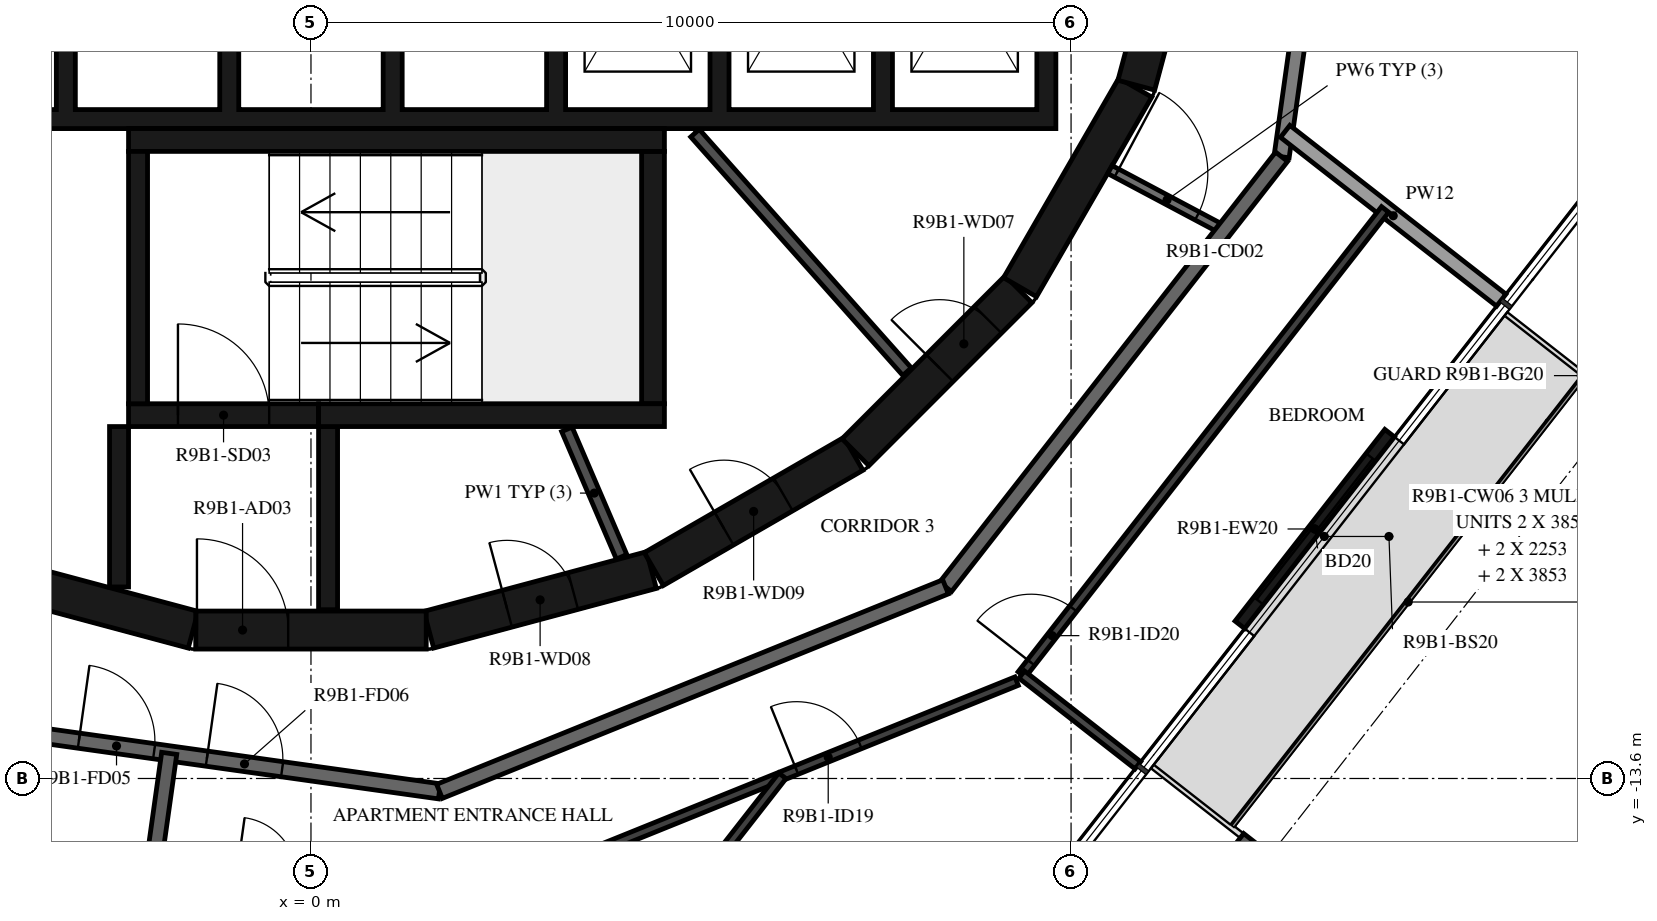
"""IFC4 building model, lengths in metres.
Left out: names, types, materials, properties, quantities, classifications, styles, units other than length and angle.
Written with IfcOpenShell. Run it as: python <this file> out.ifc"""

import sys

from ifc_helpers import new_model, si_unit, direction, frame, frame_2d, origin, origin_2d, place, context, subcontext, project, spatial, polyline, rectangle, i_section, outline, extrude, element, fill, save


model = new_model("IFC4")
c1 = context("Model", 3, precision=1e-05, world=origin(), true_north=direction((0.0, 1.0)))
c2 = subcontext(c1, "Body", "Model", "MODEL_VIEW")
j1 = project(units=[si_unit("LENGTHUNIT", "METRE"), si_unit("PLANEANGLEUNIT", "RADIAN")], contexts=[c1])
p1 = place(None, origin())
s1 = spatial("IfcSite", under=j1, at=p1, CompositionType="ELEMENT")
p2 = place(p1, origin())
s2 = spatial("IfcBuilding", under=s1, at=p2, CompositionType="ELEMENT")
p3 = place(p2, frame((0.0, 0.0, 343.5)))
s3 = spatial("IfcBuildingStorey", under=s2, at=p3, CompositionType="ELEMENT", Elevation=343.5)
p4 = place(p3, frame((12.533, -14.719, -0.38), z_axis=(0.0, 0.0, 1.0), x_axis=(-0.615661060634, -0.788011077599, 0.0)))
e1 = element("IfcColumn", 1, at=p4, inside=s3, PredefinedType="COLUMN", context=c2, shape_type="SweptSolid", body=[
    extrude(i_section(OverallWidth=0.3, OverallDepth=0.9, WebThickness=0.019, FlangeThickness=0.035, FilletRadius=0.03, at=origin_2d()), origin(), (0.0, 0.0, 1.0), 3.5),
])
p5 = place(p3, frame((12.221, -11.578, 0.0), z_axis=(0.0, 0.0, 1.0), x_axis=(0.615666248856, 0.788007024093, 0.0)))
e2 = element("IfcWall", 2, at=p5, inside=s3, PredefinedType="STANDARD", context=c2, shape_type="SweptSolid", body=[
    extrude(rectangle(XDim=3.2, YDim=0.16, at=frame_2d((1.6, 0.0))), origin(), (0.0, 0.0, 1.0), 3.12),
])
p6 = place(p5, frame((0.4, 0.0, 0.0)))
e3 = element("IfcOpeningElement", 3, at=p6, cuts=e2, PredefinedType="OPENING", context=c2, shape_type="SweptSolid", body=[
    extrude(rectangle(XDim=2.4, YDim=2.4, at=frame_2d((1.2, 1.2))), frame((0.0, 0.09, 0.0), z_axis=(0.0, -1.0, 0.0), x_axis=(1.0, 0.0, 0.0)), (0.0, 0.0, 1.0), 0.18),
])
p7 = place(p3, frame((1.55, -11.643, 0.0), z_axis=(0.0, 0.0, 1.0), x_axis=(0.965948410781, 0.258734743916, 0.0)))
e4 = element("IfcWall", 4, at=p7, inside=s3, PredefinedType="SHEAR", context=c2, shape_type="SweptSolid", body=[
    extrude(rectangle(XDim=3.033, YDim=0.5, at=frame_2d((1.516, 0.0))), origin(), (0.0, 0.0, 1.0), 3.12),
])
p8 = place(p7, frame((1.066, 0.0, 0.0)))
e5 = element("IfcOpeningElement", 5, at=p8, cuts=e4, PredefinedType="OPENING", context=c2, shape_type="SweptSolid", body=[
    extrude(rectangle(XDim=0.9, YDim=2.1, at=frame_2d((0.45, 1.05))), frame((0.0, 0.26, 0.0), z_axis=(0.0, -1.0, 0.0), x_axis=(1.0, 0.0, 0.0)), (0.0, 0.0, 1.0), 0.52),
])
p9 = place(p3, frame((4.51, -10.845, 0.0), z_axis=(0.0, 0.0, 1.0), x_axis=(0.865975092491, 0.500087131594, 0.0)))
e6 = element("IfcWall", 6, at=p9, inside=s3, PredefinedType="SHEAR", context=c2, shape_type="SweptSolid", body=[
    extrude(rectangle(XDim=3.033, YDim=0.5, at=frame_2d((1.516, 0.0))), origin(), (0.0, 0.0, 1.0), 3.12),
])
p10 = place(p9, frame((1.066, 0.0, 0.0)))
e7 = element("IfcOpeningElement", 7, at=p10, cuts=e6, PredefinedType="OPENING", context=c2, shape_type="SweptSolid", body=[
    extrude(rectangle(XDim=0.9, YDim=2.1, at=frame_2d((0.45, 1.05))), frame((0.0, 0.26, 0.0), z_axis=(0.0, -1.0, 0.0), x_axis=(1.0, 0.0, 0.0)), (0.0, 0.0, 1.0), 0.52),
])
p11 = place(p3, frame((7.164, -9.308, 0.0), z_axis=(0.0, 0.0, 1.0), x_axis=(0.707106781187, 0.707106781187, 0.0)))
e8 = element("IfcWall", 8, at=p11, inside=s3, PredefinedType="SHEAR", context=c2, shape_type="SweptSolid", body=[
    extrude(rectangle(XDim=3.032, YDim=0.5, at=frame_2d((1.516, 0.0))), origin(), (0.0, 0.0, 1.0), 3.12),
])
p12 = place(p11, frame((1.566, 0.0, 0.0)))
e9 = element("IfcOpeningElement", 9, at=p12, cuts=e8, PredefinedType="OPENING", context=c2, shape_type="SweptSolid", body=[
    extrude(rectangle(XDim=0.9, YDim=2.1, at=frame_2d((0.45, 1.05))), frame((0.0, 0.26, 0.0), z_axis=(0.0, -1.0, 0.0), x_axis=(1.0, 0.0, 0.0)), (0.0, 0.0, 1.0), 0.52),
])
for number, where, z_axis, x_axis in (
    (10, (9.329, -7.137, 0.0), (0.0, 0.0, 1.0), (0.5, 0.866, 0.0)),
    (11, (10.858, -4.479, 0.0), (0.0, 0.0, 1.0), (0.259, 0.966, 0.0)),
    (12, (-4.479, -10.858, 0.0), (0.0, 0.0, 1.0), (0.966, -0.259, 0.0)),
):
    element("IfcWall", number, at=place(p3, frame(where, z_axis=z_axis, x_axis=x_axis)), inside=s3, PredefinedType="SHEAR", context=c2, shape_type="SweptSolid", body=[
        extrude(rectangle(XDim=3.033, YDim=0.5, at=frame_2d((1.516, 0.0))), origin(), (0.0, 0.0, 1.0), 3.12),
    ])
p13 = place(p3, frame((-1.516, -11.647, 0.0), z_axis=(0.0, 0.0, 1.0), x_axis=(1.0, 0.0, 0.0)))
e13 = element("IfcWall", 13, at=p13, inside=s3, PredefinedType="SHEAR", context=c2, shape_type="SweptSolid", body=[
    extrude(rectangle(XDim=3.033, YDim=0.5, at=frame_2d((1.516, 0.0))), origin(), (0.0, 0.0, 1.0), 3.12),
])
p14 = place(p13, frame((0.016, 0.0, 0.0)))
e14 = element("IfcOpeningElement", 14, at=p14, cuts=e13, PredefinedType="OPENING", context=c2, shape_type="SweptSolid", body=[
    extrude(rectangle(XDim=1.2, YDim=2.1, at=frame_2d((0.6, 1.05))), frame((0.0, 0.26, 0.0), z_axis=(0.0, -1.0, 0.0), x_axis=(1.0, 0.0, 0.0)), (0.0, 0.0, 1.0), 0.52),
])
p15 = place(p3, frame((-2.275, -8.67, 0.0), z_axis=(0.0, 0.0, 1.0), x_axis=(0.0, 1.0, 0.0)))
e15 = element("IfcWall", 15, at=p15, inside=s3, PredefinedType="SHEAR", context=c2, shape_type="SweptSolid", body=[
    extrude(rectangle(XDim=3.32, YDim=0.25, at=frame_2d((1.66, 0.0))), origin(), (0.0, 0.0, 1.0), 3.12),
])
p16 = place(p3, frame((-2.4, -5.2, 0.0), z_axis=(0.0, 0.0, 1.0), x_axis=(1.0, 0.0, 0.0)))
e16 = element("IfcWall", 16, at=p16, inside=s3, PredefinedType="SHEAR", context=c2, shape_type="SweptSolid", body=[
    extrude(rectangle(XDim=7.05, YDim=0.3, at=frame_2d((3.525, 0.0))), origin(), (0.0, 0.0, 1.0), 3.12),
])
p17 = place(p3, frame((4.5, -8.67, 0.0), z_axis=(0.0, 0.0, 1.0), x_axis=(0.0, 1.0, 0.0)))
e17 = element("IfcWall", 17, at=p17, inside=s3, PredefinedType="SHEAR", context=c2, shape_type="SweptSolid", body=[
    extrude(rectangle(XDim=3.32, YDim=0.3, at=frame_2d((1.66, 0.0))), origin(), (0.0, 0.0, 1.0), 3.12),
])
p18 = place(p3, frame((0.1, -8.82, 0.0), z_axis=(0.0, 0.0, 1.0), x_axis=(1.0, 0.0, 0.0)))
e18 = element("IfcWall", 18, at=p18, inside=s3, PredefinedType="SHEAR", context=c2, shape_type="SweptSolid", body=[
    extrude(rectangle(XDim=4.55, YDim=0.3, at=frame_2d((2.275, 0.0))), origin(), (0.0, 0.0, 1.0), 3.12),
])
p19 = place(p3, frame((-2.4, -8.82, 0.0), z_axis=(0.0, 0.0, 1.0), x_axis=(1.0, 0.0, 0.0)))
e19 = element("IfcWall", 19, at=p19, inside=s3, PredefinedType="SHEAR", context=c2, shape_type="SweptSolid", body=[
    extrude(rectangle(XDim=2.5, YDim=0.3, at=frame_2d((1.25, 0.0))), origin(), (0.0, 0.0, 1.0), 3.12),
])
p20 = place(p19, frame((0.65, 0.0, 0.0)))
e20 = element("IfcOpeningElement", 20, at=p20, cuts=e19, PredefinedType="OPENING", context=c2, shape_type="SweptSolid", body=[
    extrude(rectangle(XDim=1.2, YDim=2.1, at=frame_2d((0.6, 1.05))), frame((0.0, 0.16, 0.0), z_axis=(0.0, -1.0, 0.0), x_axis=(1.0, 0.0, 0.0)), (0.0, 0.0, 1.0), 0.32),
])
p21 = place(p3, frame((-2.525, -8.97, 0.0), z_axis=(0.0, 0.0, 1.0), x_axis=(0.0, -1.0, 0.0)))
e21 = element("IfcWall", 21, at=p21, inside=s3, PredefinedType="SHEAR", context=c2, shape_type="SweptSolid", body=[
    extrude(rectangle(XDim=2.11, YDim=0.25, at=frame_2d((1.055, 0.0))), origin(), (0.0, 0.0, 1.0), 3.12),
])
p22 = place(p3, frame((0.225, -8.97, 0.0), z_axis=(0.0, 0.0, 1.0), x_axis=(0.0, -1.0, 0.0)))
e22 = element("IfcWall", 22, at=p22, inside=s3, PredefinedType="SHEAR", context=c2, shape_type="SweptSolid", body=[
    extrude(rectangle(XDim=2.41, YDim=0.25, at=frame_2d((1.205, 0.0))), origin(), (0.0, 0.0, 1.0), 3.12),
])
p23 = place(p3, origin())
e23 = element("IfcWall", 23, at=p23, inside=s3, PredefinedType="SHEAR", context=c2, shape_type="SweptSolid", body=[
    extrude(outline(polyline([(9.8, -5.05), (9.8, -4.8), (9.8, -1.9), (9.55, -1.9), (9.55, -4.8), (7.65, -4.8), (7.65, -1.9), (7.4, -1.9), (7.4, -4.8), (5.5, -4.8), (5.5, -1.9), (5.25, -1.9), (5.25, -4.8), (3.35, -4.8), (3.35, -1.9), (3.1, -1.9), (3.1, -4.8), (1.2, -4.8), (1.2, -1.9), (0.95, -1.9), (0.95, -4.8), (-0.95, -4.8), (-0.95, -1.9), (-1.2, -1.9), (-1.2, -4.8), (-3.1, -4.8), (-3.1, -1.9), (-3.35, -1.9), (-3.35, -4.8), (-5.25, -4.8), (-5.25, -1.9), (-5.5, -1.9), (-5.5, -4.8), (-9.55, -4.8), (-9.55, -1.9), (-9.8, -1.9), (-9.8, -4.8), (-9.8, -5.05), (9.8, -5.05)])), origin(), (0.0, 0.0, 1.0), 3.12),
])
p24 = place(p3, frame((7.842, -8.248, 0.0), z_axis=(0.0, 0.0, 1.0), x_axis=(-0.66446128181, 0.747322691329, 0.0)))
e24 = element("IfcWall", 24, at=p24, inside=s3, PredefinedType="PARTITIONING", context=c2, shape_type="SweptSolid", body=[
    extrude(rectangle(XDim=4.198, YDim=0.15, at=frame_2d((2.099, 0.0))), origin(), (0.0, 0.0, 1.0), 3.12),
])
p25 = place(p3, frame((3.367, -9.007, 0.0), z_axis=(0.0, 0.0, 1.0), x_axis=(0.394387482265, -0.918944238696, 0.0)))
e25 = element("IfcWall", 25, at=p25, inside=s3, PredefinedType="PARTITIONING", context=c2, shape_type="SweptSolid", body=[
    extrude(rectangle(XDim=1.825, YDim=0.15, at=frame_2d((0.913, 0.0))), origin(), (0.0, 0.0, 1.0), 3.12),
])
p26 = place(p3, frame((10.511, -5.589, 0.0), z_axis=(0.0, 0.0, 1.0), x_axis=(0.882959677414, -0.469448834337, 0.0)))
e26 = element("IfcWall", 26, at=p26, inside=s3, PredefinedType="PARTITIONING", context=c2, shape_type="SweptSolid", body=[
    extrude(rectangle(XDim=1.702, YDim=0.12, at=frame_2d((0.851, 0.0))), origin(), (0.0, 0.0, 1.0), 3.12),
])
p27 = place(p26, frame((0.1, 0.0, 0.0)))
e27 = element("IfcOpeningElement", 27, at=p27, cuts=e26, PredefinedType="OPENING", context=c2, shape_type="SweptSolid", body=[
    extrude(rectangle(XDim=1.2, YDim=2.1, at=frame_2d((0.6, 1.05))), frame((0.0, 0.07, 0.0), z_axis=(0.0, -1.0, 0.0), x_axis=(1.0, 0.0, 0.0)), (0.0, 0.0, 1.0), 0.14),
])
p28 = place(p3, frame((12.77, -5.42, 0.0), z_axis=(0.0, 0.0, 1.0), x_axis=(0.139155334385, 0.990270565508, 0.0)))
e28 = element("IfcWall", 28, at=p28, inside=s3, PredefinedType="STANDARD", context=c2, shape_type="SweptSolid", body=[
    extrude(rectangle(XDim=7.181, YDim=0.2, at=frame_2d((3.59, 0.0))), origin(), (0.0, 0.0, 1.0), 3.12),
])
p29 = place(p28, frame((2.039, 0.0, 0.0)))
e29 = element("IfcOpeningElement", 29, at=p29, cuts=e28, PredefinedType="OPENING", context=c2, shape_type="SweptSolid", body=[
    extrude(rectangle(XDim=1.8, YDim=2.1, at=frame_2d((0.9, 1.05))), frame((0.0, 0.11, 0.0), z_axis=(0.0, -1.0, 0.0), x_axis=(1.0, 0.0, 0.0)), (0.0, 0.0, 1.0), 0.22),
])
p30 = place(p3, frame((8.349, -11.079, 0.0), z_axis=(0.0, 0.0, 1.0), x_axis=(0.615669112324, 0.78800478687, 0.0)))
e30 = element("IfcWall", 30, at=p30, inside=s3, PredefinedType="STANDARD", context=c2, shape_type="SweptSolid", body=[
    extrude(rectangle(XDim=7.181, YDim=0.2, at=frame_2d((3.591, 0.0))), origin(), (0.0, 0.0, 1.0), 3.12),
])
p31 = place(p3, frame((-5.42, -12.77, 0.0), z_axis=(0.0, 0.0, 1.0), x_axis=(0.990270565508, -0.139155334385, 0.0)))
e31 = element("IfcWall", 31, at=p31, inside=s3, PredefinedType="STANDARD", context=c2, shape_type="SweptSolid", body=[
    extrude(rectangle(XDim=7.181, YDim=0.2, at=frame_2d((3.59, 0.0))), origin(), (0.0, 0.0, 1.0), 3.12),
])
p32 = place(p31, frame((2.39, 0.0, 0.0)))
e32 = element("IfcOpeningElement", 32, at=p32, cuts=e31, PredefinedType="OPENING", context=c2, shape_type="SweptSolid", body=[
    extrude(rectangle(XDim=1.0, YDim=2.1, at=frame_2d((0.5, 1.05))), frame((0.0, 0.11, 0.0), z_axis=(0.0, -1.0, 0.0), x_axis=(1.0, 0.0, 0.0)), (0.0, 0.0, 1.0), 0.22),
])
p33 = place(p31, frame((4.091, 0.0, 0.0)))
e33 = element("IfcOpeningElement", 33, at=p33, cuts=e31, PredefinedType="OPENING", context=c2, shape_type="SweptSolid", body=[
    extrude(rectangle(XDim=1.0, YDim=2.1, at=frame_2d((0.5, 1.05))), frame((0.0, 0.11, 0.0), z_axis=(0.0, -1.0, 0.0), x_axis=(1.0, 0.0, 0.0)), (0.0, 0.0, 1.0), 0.22),
])
p34 = place(p3, frame((1.691, -13.769, 0.0), z_axis=(0.0, 0.0, 1.0), x_axis=(0.92717916932, 0.374618189599, 0.0)))
e34 = element("IfcWall", 34, at=p34, inside=s3, PredefinedType="STANDARD", context=c2, shape_type="SweptSolid", body=[
    extrude(rectangle(XDim=7.181, YDim=0.2, at=frame_2d((3.591, 0.0))), origin(), (0.0, 0.0, 1.0), 3.12),
])
p35 = place(p3, frame((12.817, -5.086, 0.0), z_axis=(0.0, 0.0, 1.0), x_axis=(0.787994616725, -0.615682129034, 0.0)))
e35 = element("IfcWall", 35, at=p35, inside=s3, PredefinedType="STANDARD", context=c2, shape_type="SweptSolid", body=[
    extrude(rectangle(XDim=3.607, YDim=0.2, at=frame_2d((1.804, 0.0))), origin(), (0.0, 0.0, 1.0), 2.73),
])
p36 = place(p3, frame((-2.073, -14.755, 0.0), z_axis=(0.0, 0.0, 1.0), x_axis=(0.139005431033, 0.990291618738, 0.0)))
e36 = element("IfcWall", 36, at=p36, inside=s3, PredefinedType="STANDARD", context=c2, shape_type="SweptSolid", body=[
    extrude(rectangle(XDim=1.5, YDim=0.2, at=frame_2d((0.75, 0.0))), origin(), (0.0, 0.0, 1.0), 3.12),
])
p37 = place(p3, frame((-6.027, -14.199, 0.0), z_axis=(0.0, 0.0, 1.0), x_axis=(0.990271617837, -0.139147845494, 0.0)))
e37 = element("IfcWall", 37, at=p37, inside=s3, PredefinedType="PARTITIONING", context=c2, shape_type="SweptSolid", body=[
    extrude(rectangle(XDim=7.308, YDim=0.12, at=frame_2d((3.654, 0.0))), origin(), (0.0, 0.0, 1.0), 3.12),
])
p38 = place(p37, frame((5.093, 0.0, 0.0)))
e38 = element("IfcOpeningElement", 38, at=p38, cuts=e37, PredefinedType="OPENING", context=c2, shape_type="SweptSolid", body=[
    extrude(rectangle(XDim=0.8, YDim=2.1, at=frame_2d((0.4, 1.05))), frame((0.0, 0.07, 0.0), z_axis=(0.0, -1.0, 0.0), x_axis=(1.0, 0.0, 0.0)), (0.0, 0.0, 1.0), 0.14),
])
p39 = place(p3, frame((2.912, -14.894, 0.0), z_axis=(0.0, 0.0, 1.0), x_axis=(0.927182280165, 0.374610490174, 0.0)))
e39 = element("IfcWall", 39, at=p39, inside=s3, PredefinedType="PARTITIONING", context=c2, shape_type="SweptSolid", body=[
    extrude(rectangle(XDim=6.872, YDim=0.12, at=frame_2d((3.436, 0.0))), origin(), (0.0, 0.0, 1.0), 3.12),
])
p40 = place(p39, frame((3.748, 0.0, 0.0)))
e40 = element("IfcOpeningElement", 40, at=p40, cuts=e39, PredefinedType="OPENING", context=c2, shape_type="SweptSolid", body=[
    extrude(rectangle(XDim=0.9, YDim=2.1, at=frame_2d((0.45, 1.05))), frame((0.0, 0.07, 0.0), z_axis=(0.0, -1.0, 0.0), x_axis=(1.0, 0.0, 0.0)), (0.0, 0.0, 1.0), 0.14),
])
p41 = place(p3, frame((9.351, -12.233, 0.0), z_axis=(0.0, 0.0, 1.0), x_axis=(0.615678207218, 0.787997680933, 0.0)))
e41 = element("IfcWall", 41, at=p41, inside=s3, PredefinedType="PARTITIONING", context=c2, shape_type="SweptSolid", body=[
    extrude(rectangle(XDim=7.765, YDim=0.12, at=frame_2d((3.883, 0.0))), origin(), (0.0, 0.0, 1.0), 3.12),
])
p42 = place(p41, frame((0.2, 0.0, 0.0)))
e42 = element("IfcOpeningElement", 42, at=p42, cuts=e41, PredefinedType="OPENING", context=c2, shape_type="SweptSolid", body=[
    extrude(rectangle(XDim=0.9, YDim=2.1, at=frame_2d((0.45, 1.05))), frame((0.0, 0.07, 0.0), z_axis=(0.0, -1.0, 0.0), x_axis=(1.0, 0.0, 0.0)), (0.0, 0.0, 1.0), 0.14),
])
p43 = place(p3, frame((1.136, -20.049, 0.0), z_axis=(0.0, 0.0, 1.0), x_axis=(0.615662465763, 0.788009979792, 0.0)))
e43 = element("IfcWall", 43, at=p43, inside=s3, PredefinedType="PARTITIONING", context=c2, shape_type="SweptSolid", body=[
    extrude(rectangle(XDim=8.229, YDim=0.12, at=frame_2d((4.114, 0.0))), origin(), (0.0, 0.0, 1.0), 3.12),
])
p44 = place(p43, frame((0.2, 0.0, 0.0)))
e44 = element("IfcOpeningElement", 44, at=p44, cuts=e43, PredefinedType="OPENING", context=c2, shape_type="SweptSolid", body=[
    extrude(rectangle(XDim=0.9, YDim=2.1, at=frame_2d((0.45, 1.05))), frame((0.0, 0.07, 0.0), z_axis=(0.0, -1.0, 0.0), x_axis=(1.0, 0.0, 0.0)), (0.0, 0.0, 1.0), 0.14),
])
p45 = place(p3, frame((10.878, -13.427, 0.0), z_axis=(0.0, 0.0, 1.0), x_axis=(-0.787980458379, 0.615700249483, 0.0)))
e45 = element("IfcWall", 45, at=p45, inside=s3, PredefinedType="PARTITIONING", context=c2, shape_type="SweptSolid", body=[
    extrude(rectangle(XDim=1.939, YDim=0.12, at=frame_2d((0.969, 0.0))), origin(), (0.0, 0.0, 1.0), 2.73),
])
p46 = place(p6, origin())
e46 = element("IfcDoor", 46, at=p46, inside=s3, OperationType="DOUBLE_DOOR_SLIDING", PredefinedType="DOOR", context=c2, shape_type="SweptSolid", body=[
    extrude(rectangle(XDim=2.4, YDim=2.4, at=frame_2d((1.2, 1.2))), frame((0.0, 0.025, 0.0), z_axis=(0.0, -1.0, 0.0), x_axis=(1.0, 0.0, 0.0)), (0.0, 0.0, 1.0), 0.05),
])
fill(e3, e46)
p47 = place(p20, origin())
e47 = element("IfcDoor", 47, at=p47, inside=s3, OperationType="SINGLE_SWING_LEFT", PredefinedType="DOOR", context=c2, shape_type="SweptSolid", body=[
    extrude(rectangle(XDim=1.2, YDim=2.1, at=frame_2d((0.6, 1.05))), frame((0.0, 0.025, 0.0), z_axis=(0.0, -1.0, 0.0), x_axis=(1.0, 0.0, 0.0)), (0.0, 0.0, 1.0), 0.05),
])
fill(e20, e47)
p48 = place(p14, origin())
e48 = element("IfcDoor", 48, at=p48, inside=s3, OperationType="SINGLE_SWING_RIGHT", PredefinedType="DOOR", context=c2, shape_type="SweptSolid", body=[
    extrude(rectangle(XDim=1.2, YDim=2.1, at=frame_2d((0.6, 1.05))), frame((0.0, 0.025, 0.0), z_axis=(0.0, -1.0, 0.0), x_axis=(1.0, 0.0, 0.0)), (0.0, 0.0, 1.0), 0.05),
])
fill(e14, e48)
p49 = place(p12, origin())
e49 = element("IfcDoor", 49, at=p49, inside=s3, OperationType="SINGLE_SWING_LEFT", PredefinedType="DOOR", context=c2, shape_type="SweptSolid", body=[
    extrude(rectangle(XDim=0.9, YDim=2.1, at=frame_2d((0.45, 1.05))), frame((0.0, 0.025, 0.0), z_axis=(0.0, -1.0, 0.0), x_axis=(1.0, 0.0, 0.0)), (0.0, 0.0, 1.0), 0.05),
])
fill(e9, e49)
p50 = place(p8, origin())
e50 = element("IfcDoor", 50, at=p50, inside=s3, OperationType="SINGLE_SWING_RIGHT", PredefinedType="DOOR", context=c2, shape_type="SweptSolid", body=[
    extrude(rectangle(XDim=0.9, YDim=2.1, at=frame_2d((0.45, 1.05))), frame((0.0, 0.025, 0.0), z_axis=(0.0, -1.0, 0.0), x_axis=(1.0, 0.0, 0.0)), (0.0, 0.0, 1.0), 0.05),
])
fill(e5, e50)
p51 = place(p10, origin())
e51 = element("IfcDoor", 51, at=p51, inside=s3, OperationType="SINGLE_SWING_LEFT", PredefinedType="DOOR", context=c2, shape_type="SweptSolid", body=[
    extrude(rectangle(XDim=0.9, YDim=2.1, at=frame_2d((0.45, 1.05))), frame((0.0, 0.025, 0.0), z_axis=(0.0, -1.0, 0.0), x_axis=(1.0, 0.0, 0.0)), (0.0, 0.0, 1.0), 0.05),
])
fill(e7, e51)
p52 = place(p32, origin())
e52 = element("IfcDoor", 52, at=p52, inside=s3, OperationType="SINGLE_SWING_RIGHT", PredefinedType="DOOR", context=c2, shape_type="SweptSolid", body=[
    extrude(rectangle(XDim=1.0, YDim=2.1, at=frame_2d((0.5, 1.05))), frame((0.0, 0.025, 0.0), z_axis=(0.0, -1.0, 0.0), x_axis=(1.0, 0.0, 0.0)), (0.0, 0.0, 1.0), 0.05),
])
fill(e32, e52)
p53 = place(p33, origin())
e53 = element("IfcDoor", 53, at=p53, inside=s3, OperationType="SINGLE_SWING_RIGHT", PredefinedType="DOOR", context=c2, shape_type="SweptSolid", body=[
    extrude(rectangle(XDim=1.0, YDim=2.1, at=frame_2d((0.5, 1.05))), frame((0.0, 0.025, 0.0), z_axis=(0.0, -1.0, 0.0), x_axis=(1.0, 0.0, 0.0)), (0.0, 0.0, 1.0), 0.05),
])
fill(e33, e53)
p54 = place(p40, origin())
e54 = element("IfcDoor", 54, at=p54, inside=s3, OperationType="SINGLE_SWING_LEFT", PredefinedType="DOOR", context=c2, shape_type="SweptSolid", body=[
    extrude(rectangle(XDim=0.9, YDim=2.1, at=frame_2d((0.45, 1.05))), frame((0.0, 0.025, 0.0), z_axis=(0.0, -1.0, 0.0), x_axis=(1.0, 0.0, 0.0)), (0.0, 0.0, 1.0), 0.05),
])
fill(e40, e54)
p55 = place(p42, origin())
e55 = element("IfcDoor", 55, at=p55, inside=s3, OperationType="SINGLE_SWING_LEFT", PredefinedType="DOOR", context=c2, shape_type="SweptSolid", body=[
    extrude(rectangle(XDim=0.9, YDim=2.1, at=frame_2d((0.45, 1.05))), frame((0.0, 0.025, 0.0), z_axis=(0.0, -1.0, 0.0), x_axis=(1.0, 0.0, 0.0)), (0.0, 0.0, 1.0), 0.05),
])
fill(e42, e55)
p56 = place(p27, origin())
e56 = element("IfcDoor", 56, at=p56, inside=s3, OperationType="DOUBLE_DOOR_SINGLE_SWING", PredefinedType="DOOR", context=c2, shape_type="SweptSolid", body=[
    extrude(rectangle(XDim=1.2, YDim=2.1, at=frame_2d((0.6, 1.05))), frame((0.0, 0.025, 0.0), z_axis=(0.0, -1.0, 0.0), x_axis=(1.0, 0.0, 0.0)), (0.0, 0.0, 1.0), 0.05),
])
fill(e27, e56)
save(model, sys.argv[1])
